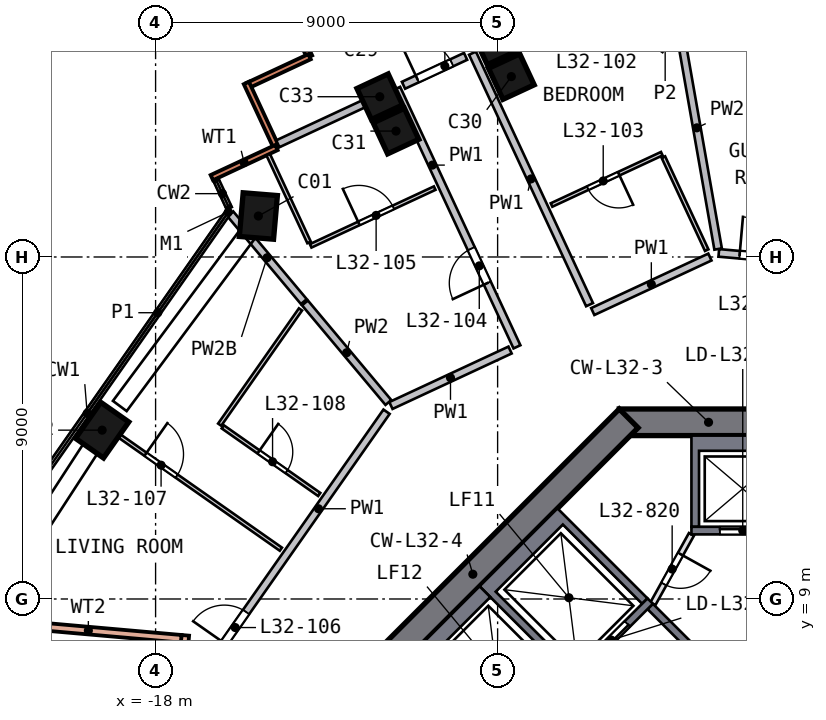
"""IFC4 building model, lengths in metres.
Left out: names, types, materials, properties, quantities, classifications, styles, units other than length and angle.
Written with IfcOpenShell. Run it as: python <this file> out.ifc"""

import sys

from ifc_helpers import new_model, si_unit, direction, frame, frame_2d, origin, origin_2d, place, context, subcontext, project, spatial, polyline, rectangle, outline, extrude, element, fill, save


model = new_model("IFC4")
c1 = context("Model", 3, precision=1e-05, world=origin(), true_north=direction((0.0, 1.0)))
c2 = subcontext(c1, "Body", "Model", "MODEL_VIEW")
j1 = project(units=[si_unit("LENGTHUNIT", "METRE"), si_unit("PLANEANGLEUNIT", "RADIAN")], contexts=[c1])
p1 = place(None, origin())
s1 = spatial("IfcSite", under=j1, at=p1, CompositionType="ELEMENT")
p2 = place(p1, origin())
s2 = spatial("IfcBuilding", under=s1, at=p2, CompositionType="ELEMENT")
p3 = place(p2, frame((0.0, 0.0, 136.5)))
s3 = spatial("IfcBuildingStorey", under=s2, at=p3, CompositionType="ELEMENT", Elevation=136.5)
p4 = place(p3, frame((-15.186, 19.167, 0.0), z_axis=(-0.090534241, -0.072974703, 0.993216111), x_axis=(0.080826173, 0.993483318, 0.080361852)))
e1 = element("IfcColumn", 1, at=p4, inside=s3, PredefinedType="COLUMN", context=c2, shape_type="SweptSolid", body=[
    extrude(rectangle(XDim=1.15, YDim=0.9, at=origin_2d()), origin(), (0.0, 0.0, 1.0), 3.212),
])
p5 = place(p3, frame((-19.329, 13.555, 0.0), z_axis=(-0.063730151, -0.092477164, 0.993673207), x_axis=(-0.57078057, -0.813386058, -0.112306105)))
e2 = element("IfcColumn", 2, at=p5, inside=s3, PredefinedType="COLUMN", context=c2, shape_type="SweptSolid", body=[
    extrude(rectangle(XDim=1.15, YDim=0.9, at=origin_2d()), origin(), (0.0, 0.0, 1.0), 3.21),
])
for number, where, z_axis, x_axis in (
    (3, (-8.508, 22.797, 0.0), (-0.108, -0.041, 0.993), (-0.421, 0.907, -0.008)),
    (4, (-11.551, 21.381, 0.0), (-0.101, -0.056, 0.993), (-0.423, 0.906, 0.008)),
):
    element("IfcColumn", number, at=place(p3, frame(where, z_axis=z_axis, x_axis=x_axis)), inside=s3, PredefinedType="COLUMN", context=c2, shape_type="SweptSolid", body=[
        extrude(rectangle(XDim=0.9, YDim=0.9, at=origin_2d()), origin(), (0.0, 0.0, 1.0), 3.211),
    ])
p6 = place(p3, frame((-8.915, 23.711, 0.0), z_axis=(-0.11229609, -0.043231715, 0.992733905), x_axis=(-0.42060935, 0.907205946, -0.008071364)))
e5 = element("IfcColumn", 5, at=p6, inside=s3, PredefinedType="COLUMN", context=c2, shape_type="SweptSolid", body=[
    extrude(rectangle(XDim=0.9, YDim=0.9, at=origin_2d()), origin(), (0.0, 0.0, 1.0), 3.213),
])
p7 = place(p3, frame((-11.973, 22.287, 0.0), z_axis=(-0.105459281, -0.057744275, 0.992745657), x_axis=(-0.422473526, 0.906341364, 0.007839138)))
e6 = element("IfcColumn", 6, at=p7, inside=s3, PredefinedType="COLUMN", context=c2, shape_type="SweptSolid", body=[
    extrude(rectangle(XDim=0.9, YDim=0.9, at=origin_2d()), origin(), (0.0, 0.0, 1.0), 3.213),
])
p8 = place(p3, frame((5.799, 13.65, 0.0), z_axis=(0.0, 0.0, 1.0), x_axis=(-1.0, 0.0, 0.0)))
e7 = element("IfcWall", 7, at=p8, inside=s3, PredefinedType="SHEAR", context=c2, shape_type="SweptSolid", body=[
    extrude(rectangle(XDim=11.598, YDim=0.7, at=frame_2d((5.799, 0.0))), origin(), (0.0, 0.0, 1.0), 3.5),
])
p9 = place(p8, frame((4.899, 0.0, 0.0)))
e8 = element("IfcOpeningElement", 8, at=p9, cuts=e7, PredefinedType="OPENING", context=c2, shape_type="SweptSolid", body=[
    extrude(rectangle(XDim=1.8, YDim=2.1, at=frame_2d((0.9, 1.05))), frame((0.0, 0.36, 0.0), z_axis=(0.0, -1.0, 0.0), x_axis=(1.0, 0.0, 0.0)), (0.0, 0.0, 1.0), 0.72),
])
p10 = place(p3, frame((-5.552, 13.752, 0.0), z_axis=(0.0, 0.0, 1.0), x_axis=(-0.707106781, -0.707106781, 0.0)))
e9 = element("IfcWall", 9, at=p10, inside=s3, PredefinedType="SHEAR", context=c2, shape_type="SweptSolid", body=[
    extrude(rectangle(XDim=11.598, YDim=0.7, at=frame_2d((5.799, 0.0))), origin(), (0.0, 0.0, 1.0), 3.5),
])
p11 = place(p3, frame((-14.739, 24.971, 0.0), z_axis=(0.0, 0.0, 1.0), x_axis=(0.421987144, -0.906601815, 0.0)))
e10 = element("IfcWall", 10, at=p11, inside=s3, PredefinedType="SOLIDWALL", context=c2, shape_type="SweptSolid", body=[
    extrude(rectangle(XDim=1.875, YDim=0.15, at=frame_2d((0.938, 0.0))), origin(), (0.0, 0.0, 1.0), 3.19),
])
p12 = place(p3, frame((-13.948, 23.271, 0.0), z_axis=(0.0, 0.0, 1.0), x_axis=(-0.906608902, -0.421971917, 0.0)))
e11 = element("IfcWall", 11, at=p12, inside=s3, PredefinedType="SOLIDWALL", context=c2, shape_type="SweptSolid", body=[
    extrude(rectangle(XDim=1.8, YDim=0.15, at=frame_2d((0.9, 0.0))), origin(), (0.0, 0.0, 1.0), 3.19),
])
for number, where, z_axis, x_axis in (
    (12, (-15.611, 22.58, 0.0), (0.0, 0.0, 1.0), (0.422, -0.907, 0.0)),
    (13, (-14.82, 20.88, 0.0), (0.0, 0.0, 1.0), (-0.907, -0.422, 0.0)),
):
    element("IfcWall", number, at=place(p3, frame(where, z_axis=z_axis, x_axis=x_axis)), inside=s3, PredefinedType="SOLIDWALL", context=c2, shape_type="SweptSolid", body=[
        extrude(rectangle(XDim=1.875, YDim=0.15, at=frame_2d((0.938, 0.0))), origin(), (0.0, 0.0, 1.0), 3.19),
    ])
p13 = place(p3, frame((-18.36, -4.906, 0.0), z_axis=(0.0, 0.0, 1.0), x_axis=(0.087853252, 0.996133428, 0.0)))
e14 = element("IfcWall", 14, at=p13, inside=s3, PredefinedType="SOLIDWALL", context=c2, shape_type="SweptSolid", body=[
    extrude(rectangle(XDim=13.0, YDim=0.2, at=frame_2d((6.5, 0.0))), origin(), (0.0, 0.0, 1.0), 3.19),
])
p14 = place(p13, frame((5.6, 0.0, 0.0)))
e15 = element("IfcOpeningElement", 15, at=p14, cuts=e14, PredefinedType="OPENING", context=c2, shape_type="SweptSolid", body=[
    extrude(rectangle(XDim=1.8, YDim=2.4, at=frame_2d((0.9, 1.2))), frame((0.0, 0.11, 0.0), z_axis=(0.0, -1.0, 0.0), x_axis=(1.0, 0.0, 0.0)), (0.0, 0.0, 1.0), 0.22),
])
p15 = place(p3, frame((-22.212, 8.384, 0.0), z_axis=(0.0, 0.0, 1.0), x_axis=(0.996132413, -0.087864753, 0.0)))
e16 = element("IfcWall", 16, at=p15, inside=s3, PredefinedType="SOLIDWALL", context=c2, shape_type="SweptSolid", body=[
    extrude(rectangle(XDim=4.904, YDim=0.2, at=frame_2d((2.452, 0.0))), origin(), (0.0, 0.0, 1.0), 3.19),
])
p16 = place(p3, origin())
e17 = element("IfcWall", 17, at=p16, inside=s3, PredefinedType="SOLIDWALL", context=c2, shape_type="SweptSolid", body=[
    extrude(outline(polyline([(-3.9, 10.9), (-3.9, 13.3), (-1.2, 13.3), (-1.2, 10.9), (-1.4, 10.9), (-1.4, 12.9), (-3.7, 12.9), (-3.7, 10.9), (-3.9, 10.9)])), origin(), (0.0, 0.0, 1.0), 3.19),
])
p17 = place(p3, frame((-1.2, 10.8, 0.0), z_axis=(0.0, 0.0, 1.0), x_axis=(-1.0, 0.0, 0.0)))
e18 = element("IfcWall", 18, at=p17, inside=s3, PredefinedType="SOLIDWALL", context=c2, shape_type="SweptSolid", body=[
    extrude(rectangle(XDim=2.7, YDim=0.2, at=frame_2d((1.35, 0.0))), origin(), (0.0, 0.0, 1.0), 3.19),
])
p18 = place(p17, frame((0.75, 0.0, 0.0)))
e19 = element("IfcOpeningElement", 19, at=p18, cuts=e18, PredefinedType="OPENING", context=c2, shape_type="SweptSolid", body=[
    extrude(rectangle(XDim=1.2, YDim=2.1, at=frame_2d((0.6, 1.05))), frame((0.0, 0.11, 0.0), z_axis=(0.0, -1.0, 0.0), x_axis=(1.0, 0.0, 0.0)), (0.0, 0.0, 1.0), 0.22),
])
p19 = place(p3, origin())
e20 = element("IfcWall", 20, at=p19, inside=s3, PredefinedType="SOLIDWALL", context=c2, shape_type="SweptSolid", body=[
    extrude(outline(polyline([(-9.475, 9.334), (-7.425, 11.385), (-5.056, 9.016), (-5.197, 8.874), (-7.283, 10.96), (-9.051, 9.192), (-6.965, 7.106), (-7.106, 6.965), (-9.475, 9.334)])), origin(), (0.0, 0.0, 1.0), 3.19),
])
p20 = place(p3, frame((-4.985, 8.945, 0.0), z_axis=(0.0, 0.0, 1.0), x_axis=(-0.707106781, -0.707106781, 0.0)))
e21 = element("IfcWall", 21, at=p20, inside=s3, PredefinedType="SOLIDWALL", context=c2, shape_type="SweptSolid", body=[
    extrude(rectangle(XDim=2.9, YDim=0.2, at=frame_2d((1.45, 0.0))), origin(), (0.0, 0.0, 1.0), 3.19),
])
p21 = place(p20, frame((0.85, 0.0, 0.0)))
e22 = element("IfcOpeningElement", 22, at=p21, cuts=e21, PredefinedType="OPENING", context=c2, shape_type="SweptSolid", body=[
    extrude(rectangle(XDim=1.2, YDim=2.1, at=frame_2d((0.6, 1.05))), frame((0.0, 0.11, 0.0), z_axis=(0.0, -1.0, 0.0), x_axis=(1.0, 0.0, 0.0)), (0.0, 0.0, 1.0), 0.22),
])
p22 = place(p3, origin())
e23 = element("IfcWall", 23, at=p22, inside=s3, PredefinedType="SOLIDWALL", context=c2, shape_type="SweptSolid", body=[
    extrude(outline(polyline([(-11.385, 7.425), (-9.475, 9.334), (-9.192, 9.051), (-10.96, 7.283), (-8.874, 5.197), (-9.016, 5.056), (-11.385, 7.425)])), origin(), (0.0, 0.0, 1.0), 3.19),
])
p23 = place(p3, frame((-3.005, 6.823, 0.0), z_axis=(0.0, 0.0, 1.0), x_axis=(-0.707106781, 0.707106781, 0.0)))
e24 = element("IfcWall", 24, at=p23, inside=s3, PredefinedType="SOLIDWALL", context=c2, shape_type="SweptSolid", body=[
    extrude(rectangle(XDim=2.8, YDim=0.2, at=frame_2d((1.4, 0.0))), origin(), (0.0, 0.0, 1.0), 3.19),
])
p24 = place(p3, frame((-3.9, 10.7, 0.0), z_axis=(0.0, 0.0, 1.0), x_axis=(-0.485692555, -0.874129705, 0.0)))
e25 = element("IfcWall", 25, at=p24, inside=s3, PredefinedType="PARTITIONING", context=c2, shape_type="SweptSolid", body=[
    extrude(rectangle(XDim=2.089, YDim=0.15, at=frame_2d((1.044, 0.0))), origin(), (0.0, 0.0, 1.0), 3.19),
])
p25 = place(p24, frame((0.594, 0.0, 0.0)))
e26 = element("IfcOpeningElement", 26, at=p25, cuts=e25, PredefinedType="OPENING", context=c2, shape_type="SweptSolid", body=[
    extrude(rectangle(XDim=0.9, YDim=2.1, at=frame_2d((0.45, 1.05))), frame((0.0, 0.085, 0.0), z_axis=(0.0, -1.0, 0.0), x_axis=(1.0, 0.0, 0.0)), (0.0, 0.0, 1.0), 0.17),
])
p26 = place(p3, frame((-17.283, 6.284, 0.0), z_axis=(0.0, 0.0, 1.0), x_axis=(0.574151841, 0.81874884, 0.0)))
e27 = element("IfcWall", 27, at=p26, inside=s3, PredefinedType="SOLIDWALL", context=c2, shape_type="SweptSolid", body=[
    extrude(rectangle(XDim=9.336, YDim=0.2, at=frame_2d((4.668, 0.0))), origin(), (0.0, 0.0, 1.0), 3.19),
])
p27 = place(p26, frame((1.9, 0.0, 0.0)))
e28 = element("IfcOpeningElement", 28, at=p27, cuts=e27, PredefinedType="OPENING", context=c2, shape_type="SweptSolid", body=[
    extrude(rectangle(XDim=1.0, YDim=2.1, at=frame_2d((0.5, 1.05))), frame((0.0, 0.11, 0.0), z_axis=(0.0, -1.0, 0.0), x_axis=(1.0, 0.0, 0.0)), (0.0, 0.0, 1.0), 0.22),
])
p28 = place(p3, frame((-11.476, 22.519, 0.0), z_axis=(0.0, 0.0, 1.0), x_axis=(0.906570442, 0.42205454, 0.0)))
e29 = element("IfcWall", 29, at=p28, inside=s3, PredefinedType="SOLIDWALL", context=c2, shape_type="SweptSolid", body=[
    extrude(rectangle(XDim=1.802, YDim=0.2, at=frame_2d((0.901, 0.0))), origin(), (0.0, 0.0, 1.0), 3.19),
])
p29 = place(p28, frame((0.4, 0.0, 0.0)))
e30 = element("IfcOpeningElement", 30, at=p29, cuts=e29, PredefinedType="OPENING", context=c2, shape_type="SweptSolid", body=[
    extrude(rectangle(XDim=1.0, YDim=2.1, at=frame_2d((0.5, 1.05))), frame((0.0, 0.11, 0.0), z_axis=(0.0, -1.0, 0.0), x_axis=(1.0, 0.0, 0.0)), (0.0, 0.0, 1.0), 0.22),
])
p30 = place(p3, frame((-8.672, 15.551, 0.0), z_axis=(0.0, 0.0, 1.0), x_axis=(-0.906586718, -0.422019576, 0.0)))
e31 = element("IfcWall", 31, at=p30, inside=s3, PredefinedType="SOLIDWALL", context=c2, shape_type="SweptSolid", body=[
    extrude(rectangle(XDim=3.458, YDim=0.2, at=frame_2d((1.729, 0.0))), origin(), (0.0, 0.0, 1.0), 3.19),
])
p31 = place(p3, frame((-8.491, 15.635, 0.0), z_axis=(0.0, 0.0, 1.0), x_axis=(-0.421999597, 0.906596018, 0.0)))
e32 = element("IfcWall", 32, at=p31, inside=s3, PredefinedType="SOLIDWALL", context=c2, shape_type="SweptSolid", body=[
    extrude(rectangle(XDim=7.5, YDim=0.2, at=frame_2d((3.75, 0.0))), origin(), (0.0, 0.0, 1.0), 3.19),
])
p32 = place(p31, frame((1.85, 0.0, 0.0)))
e33 = element("IfcOpeningElement", 33, at=p32, cuts=e32, PredefinedType="OPENING", context=c2, shape_type="SweptSolid", body=[
    extrude(rectangle(XDim=1.0, YDim=2.1, at=frame_2d((0.5, 1.05))), frame((0.0, 0.11, 0.0), z_axis=(0.0, -1.0, 0.0), x_axis=(1.0, 0.0, 0.0)), (0.0, 0.0, 1.0), 0.22),
])
p33 = place(p3, frame((-6.581, 16.745, 0.0), z_axis=(0.0, 0.0, 1.0), x_axis=(-0.421995458, 0.906597945, 0.0)))
e34 = element("IfcWall", 34, at=p33, inside=s3, PredefinedType="SOLIDWALL", context=c2, shape_type="SweptSolid", body=[
    extrude(rectangle(XDim=7.3, YDim=0.2, at=frame_2d((3.65, 0.0))), origin(), (0.0, 0.0, 1.0), 3.19),
])
p34 = place(p3, frame((-3.414, 17.999, 0.0), z_axis=(0.0, 0.0, 1.0), x_axis=(-0.906599112, -0.42199295, 0.0)))
e35 = element("IfcWall", 35, at=p34, inside=s3, PredefinedType="SOLIDWALL", context=c2, shape_type="SweptSolid", body=[
    extrude(rectangle(XDim=3.4, YDim=0.2, at=frame_2d((1.7, 0.0))), origin(), (0.0, 0.0, 1.0), 3.19),
])
p35 = place(p3, frame((-3.18, 18.108, 0.0), z_axis=(0.0, 0.0, 1.0), x_axis=(0.996134235, -0.087844097, 0.0)))
e36 = element("IfcWall", 36, at=p35, inside=s3, PredefinedType="SOLIDWALL", context=c2, shape_type="SweptSolid", body=[
    extrude(rectangle(XDim=9.316, YDim=0.2, at=frame_2d((4.658, 0.0))), origin(), (0.0, 0.0, 1.0), 3.19),
])
p36 = place(p35, frame((0.55, 0.0, 0.0)))
e37 = element("IfcOpeningElement", 37, at=p36, cuts=e36, PredefinedType="OPENING", context=c2, shape_type="SweptSolid", body=[
    extrude(rectangle(XDim=1.0, YDim=2.1, at=frame_2d((0.5, 1.05))), frame((0.0, 0.11, 0.0), z_axis=(0.0, -1.0, 0.0), x_axis=(1.0, 0.0, 0.0)), (0.0, 0.0, 1.0), 0.22),
])
p37 = place(p3, frame((-14.099, 16.826, 0.0), z_axis=(0.0, 0.0, 1.0), x_axis=(-0.642231449, 0.766510774, 0.0)))
e38 = element("IfcWall", 38, at=p37, inside=s3, PredefinedType="SOLIDWALL", context=c2, shape_type="SweptSolid", body=[
    extrude(rectangle(XDim=3.011, YDim=0.2, at=frame_2d((1.506, 0.0))), origin(), (0.0, 0.0, 1.0), 2.69),
])
p38 = place(p3, frame((-11.835, 22.352, 0.0), z_axis=(0.0, 0.0, 1.0), x_axis=(-0.906598898, -0.421993409, 0.0)))
e39 = element("IfcWall", 39, at=p38, inside=s3, PredefinedType="SOLIDWALL", context=c2, shape_type="SweptSolid", body=[
    extrude(rectangle(XDim=3.252, YDim=0.2, at=frame_2d((1.626, 0.0))), origin(), (0.0, 0.0, 1.0), 3.19),
])
p39 = place(p3, frame((-11.874, 14.171, 0.0), z_axis=(0.0, 0.0, 1.0), x_axis=(-0.642233473, 0.766509078, 0.0)))
e40 = element("IfcWall", 40, at=p39, inside=s3, PredefinedType="SOLIDWALL", context=c2, shape_type="SweptSolid", body=[
    extrude(rectangle(XDim=3.418, YDim=0.2, at=frame_2d((1.709, 0.0))), origin(), (0.0, 0.0, 1.0), 3.19),
])
p40 = place(p3, frame((-4.318, 24.588, 0.0), z_axis=(0.0, 0.0, 1.0), x_axis=(0.172970158, -0.984927066, 0.0)))
e41 = element("IfcWall", 41, at=p40, inside=s3, PredefinedType="SOLIDWALL", context=c2, shape_type="SweptSolid", body=[
    extrude(rectangle(XDim=6.476, YDim=0.2, at=frame_2d((3.238, 0.0))), origin(), (0.0, 0.0, 1.0), 3.19),
])
p41 = place(p3, frame((-19.739, 13.842, 0.0), z_axis=(0.0, 0.0, 1.0), x_axis=(0.818756071, -0.57414153, 0.0)))
e42 = element("IfcWall", 42, at=p41, inside=s3, PredefinedType="PARTITIONING", context=c2, shape_type="SweptSolid", body=[
    extrude(rectangle(XDim=6.15, YDim=0.1, at=frame_2d((3.075, 0.0))), origin(), (0.0, 0.0, 1.0), 3.19),
])
p42 = place(p41, frame((1.8, 0.0, 0.0)))
e43 = element("IfcOpeningElement", 43, at=p42, cuts=e42, PredefinedType="OPENING", context=c2, shape_type="SweptSolid", body=[
    extrude(rectangle(XDim=1.0, YDim=2.1, at=frame_2d((0.5, 1.05))), frame((0.0, 0.06, 0.0), z_axis=(0.0, -1.0, 0.0), x_axis=(1.0, 0.0, 0.0)), (0.0, 0.0, 1.0), 0.12),
])
p43 = place(p3, frame((-14.187, 16.62, 0.0), z_axis=(0.0, 0.0, 1.0), x_axis=(-0.574152218, -0.818748576, 0.0)))
e44 = element("IfcWall", 44, at=p43, inside=s3, PredefinedType="PARTITIONING", context=c2, shape_type="SweptSolid", body=[
    extrude(rectangle(XDim=3.704, YDim=0.1, at=frame_2d((1.852, 0.0))), origin(), (0.0, 0.0, 1.0), 3.19),
])
p44 = place(p3, frame((-16.232, 13.53, 0.0), z_axis=(0.0, 0.0, 1.0), x_axis=(0.818758042, -0.574138719, 0.0)))
e45 = element("IfcWall", 45, at=p44, inside=s3, PredefinedType="PARTITIONING", context=c2, shape_type="SweptSolid", body=[
    extrude(rectangle(XDim=3.1, YDim=0.1, at=frame_2d((1.55, 0.0))), origin(), (0.0, 0.0, 1.0), 3.19),
])
p45 = place(p44, frame((1.15, 0.0, 0.0)))
e46 = element("IfcOpeningElement", 46, at=p45, cuts=e45, PredefinedType="OPENING", context=c2, shape_type="SweptSolid", body=[
    extrude(rectangle(XDim=0.9, YDim=2.1, at=frame_2d((0.45, 1.05))), frame((0.0, 0.06, 0.0), z_axis=(0.0, -1.0, 0.0), x_axis=(1.0, 0.0, 0.0)), (0.0, 0.0, 1.0), 0.12),
])
p46 = place(p3, frame((-13.962, 18.384, 0.0), z_axis=(0.0, 0.0, 1.0), x_axis=(-0.421952243, 0.906618059, 0.0)))
e47 = element("IfcWall", 47, at=p46, inside=s3, PredefinedType="PARTITIONING", context=c2, shape_type="SweptSolid", body=[
    extrude(rectangle(XDim=2.55, YDim=0.1, at=frame_2d((1.275, 0.0))), origin(), (0.0, 0.0, 1.0), 3.19),
])
p47 = place(p3, frame((-13.919, 18.293, 0.0), z_axis=(0.0, 0.0, 1.0), x_axis=(0.906608902, 0.421971917, 0.0)))
e48 = element("IfcWall", 48, at=p47, inside=s3, PredefinedType="PARTITIONING", context=c2, shape_type="SweptSolid", body=[
    extrude(rectangle(XDim=3.6, YDim=0.1, at=frame_2d((1.8, 0.0))), origin(), (0.0, 0.0, 1.0), 3.19),
])
p48 = place(p47, frame((1.4, 0.0, 0.0)))
e49 = element("IfcOpeningElement", 49, at=p48, cuts=e48, PredefinedType="OPENING", context=c2, shape_type="SweptSolid", body=[
    extrude(rectangle(XDim=1.0, YDim=2.1, at=frame_2d((0.5, 1.05))), frame((0.0, 0.06, 0.0), z_axis=(0.0, -1.0, 0.0), x_axis=(1.0, 0.0, 0.0)), (0.0, 0.0, 1.0), 0.12),
])
p49 = place(p3, frame((-4.68, 20.719, 0.0), z_axis=(0.0, 0.0, 1.0), x_axis=(-0.906603701, -0.421983091, 0.0)))
e50 = element("IfcWall", 50, at=p49, inside=s3, PredefinedType="PARTITIONING", context=c2, shape_type="SweptSolid", body=[
    extrude(rectangle(XDim=3.2, YDim=0.1, at=frame_2d((1.6, 0.0))), origin(), (0.0, 0.0, 1.0), 3.19),
])
p50 = place(p49, frame((1.25, 0.0, 0.0)))
e51 = element("IfcOpeningElement", 51, at=p50, cuts=e50, PredefinedType="OPENING", context=c2, shape_type="SweptSolid", body=[
    extrude(rectangle(XDim=0.9, YDim=2.1, at=frame_2d((0.45, 1.05))), frame((0.0, 0.06, 0.0), z_axis=(0.0, -1.0, 0.0), x_axis=(1.0, 0.0, 0.0)), (0.0, 0.0, 1.0), 0.12),
])
p51 = place(p3, frame((-3.498, 18.18, 0.0), z_axis=(0.0, 0.0, 1.0), x_axis=(-0.422009078, 0.906591605, 0.0)))
e52 = element("IfcWall", 52, at=p51, inside=s3, PredefinedType="PARTITIONING", context=c2, shape_type="SweptSolid", body=[
    extrude(rectangle(XDim=2.7, YDim=0.1, at=frame_2d((1.35, 0.0))), origin(), (0.0, 0.0, 1.0), 3.19),
])
p52 = place(p18, origin())
e53 = element("IfcDoor", 53, at=p52, inside=s3, OperationType="DOUBLE_DOOR_SLIDING", PredefinedType="DOOR", context=c2, shape_type="SweptSolid", body=[
    extrude(rectangle(XDim=1.2, YDim=2.1, at=frame_2d((0.6, 1.05))), frame((0.0, 0.025, 0.0), z_axis=(0.0, -1.0, 0.0), x_axis=(1.0, 0.0, 0.0)), (0.0, 0.0, 1.0), 0.05),
])
fill(e19, e53)
p53 = place(p21, origin())
e54 = element("IfcDoor", 54, at=p53, inside=s3, OperationType="DOUBLE_DOOR_SLIDING", PredefinedType="DOOR", context=c2, shape_type="SweptSolid", body=[
    extrude(rectangle(XDim=1.2, YDim=2.1, at=frame_2d((0.6, 1.05))), frame((0.0, 0.025, 0.0), z_axis=(0.0, -1.0, 0.0), x_axis=(1.0, 0.0, 0.0)), (0.0, 0.0, 1.0), 0.05),
])
fill(e22, e54)
p54 = place(p25, origin())
e55 = element("IfcDoor", 55, at=p54, inside=s3, OperationType="SINGLE_SWING_LEFT", PredefinedType="DOOR", context=c2, shape_type="SweptSolid", body=[
    extrude(rectangle(XDim=0.9, YDim=2.1, at=frame_2d((0.45, 1.05))), frame((0.0, 0.025, 0.0), z_axis=(0.0, -1.0, 0.0), x_axis=(1.0, 0.0, 0.0)), (0.0, 0.0, 1.0), 0.05),
])
fill(e26, e55)
p55 = place(p29, origin())
e56 = element("IfcDoor", 56, at=p55, inside=s3, OperationType="SINGLE_SWING_LEFT", PredefinedType="DOOR", context=c2, shape_type="SweptSolid", body=[
    extrude(rectangle(XDim=1.0, YDim=2.1, at=frame_2d((0.5, 1.05))), frame((0.0, 0.025, 0.0), z_axis=(0.0, -1.0, 0.0), x_axis=(1.0, 0.0, 0.0)), (0.0, 0.0, 1.0), 0.05),
])
fill(e30, e56)
p56 = place(p50, origin())
e57 = element("IfcDoor", 57, at=p56, inside=s3, OperationType="SINGLE_SWING_LEFT", PredefinedType="DOOR", context=c2, shape_type="SweptSolid", body=[
    extrude(rectangle(XDim=0.9, YDim=2.1, at=frame_2d((0.45, 1.05))), frame((0.0, 0.025, 0.0), z_axis=(0.0, -1.0, 0.0), x_axis=(1.0, 0.0, 0.0)), (0.0, 0.0, 1.0), 0.05),
])
fill(e51, e57)
p57 = place(p32, origin())
e58 = element("IfcDoor", 58, at=p57, inside=s3, OperationType="SINGLE_SWING_LEFT", PredefinedType="DOOR", context=c2, shape_type="SweptSolid", body=[
    extrude(rectangle(XDim=1.0, YDim=2.1, at=frame_2d((0.5, 1.05))), frame((0.0, 0.025, 0.0), z_axis=(0.0, -1.0, 0.0), x_axis=(1.0, 0.0, 0.0)), (0.0, 0.0, 1.0), 0.05),
])
fill(e33, e58)
p58 = place(p48, origin())
e59 = element("IfcDoor", 59, at=p58, inside=s3, OperationType="SINGLE_SWING_LEFT", PredefinedType="DOOR", context=c2, shape_type="SweptSolid", body=[
    extrude(rectangle(XDim=1.0, YDim=2.1, at=frame_2d((0.5, 1.05))), frame((0.0, 0.025, 0.0), z_axis=(0.0, -1.0, 0.0), x_axis=(1.0, 0.0, 0.0)), (0.0, 0.0, 1.0), 0.05),
])
fill(e49, e59)
p59 = place(p27, origin())
e60 = element("IfcDoor", 60, at=p59, inside=s3, OperationType="SINGLE_SWING_LEFT", PredefinedType="DOOR", context=c2, shape_type="SweptSolid", body=[
    extrude(rectangle(XDim=1.0, YDim=2.1, at=frame_2d((0.5, 1.05))), frame((0.0, 0.025, 0.0), z_axis=(0.0, -1.0, 0.0), x_axis=(1.0, 0.0, 0.0)), (0.0, 0.0, 1.0), 0.05),
])
fill(e28, e60)
p60 = place(p42, origin())
e61 = element("IfcDoor", 61, at=p60, inside=s3, OperationType="SINGLE_SWING_LEFT", PredefinedType="DOOR", context=c2, shape_type="SweptSolid", body=[
    extrude(rectangle(XDim=1.0, YDim=2.1, at=frame_2d((0.5, 1.05))), frame((0.0, 0.025, 0.0), z_axis=(0.0, -1.0, 0.0), x_axis=(1.0, 0.0, 0.0)), (0.0, 0.0, 1.0), 0.05),
])
fill(e43, e61)
p61 = place(p45, origin())
e62 = element("IfcDoor", 62, at=p61, inside=s3, OperationType="SINGLE_SWING_LEFT", PredefinedType="DOOR", context=c2, shape_type="SweptSolid", body=[
    extrude(rectangle(XDim=0.9, YDim=2.1, at=frame_2d((0.45, 1.05))), frame((0.0, 0.025, 0.0), z_axis=(0.0, -1.0, 0.0), x_axis=(1.0, 0.0, 0.0)), (0.0, 0.0, 1.0), 0.05),
])
fill(e46, e62)
p62 = place(p36, origin())
e63 = element("IfcDoor", 63, at=p62, inside=s3, OperationType="SINGLE_SWING_LEFT", PredefinedType="DOOR", context=c2, shape_type="SweptSolid", body=[
    extrude(rectangle(XDim=1.0, YDim=2.1, at=frame_2d((0.5, 1.05))), frame((0.0, 0.025, 0.0), z_axis=(0.0, -1.0, 0.0), x_axis=(1.0, 0.0, 0.0)), (0.0, 0.0, 1.0), 0.05),
])
fill(e37, e63)
save(model, sys.argv[1])
